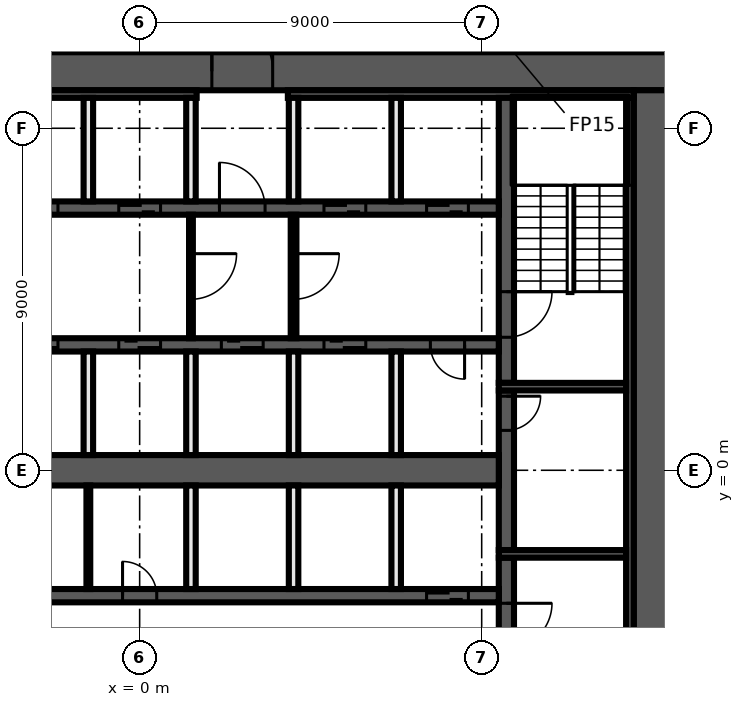
"""IFC4 building model, lengths in metres.
Left out: names, types, materials, properties, quantities, classifications, styles, units other than length and angle.
Written with IfcOpenShell. Run it as: python <this file> out.ifc"""

import sys

from ifc_helpers import new_model, si_unit, direction, frame, frame_2d, origin, place, context, subcontext, project, spatial, rectangle, extrude, element, fill, save


model = new_model("IFC4")
c1 = context("Model", 3, precision=1e-05, world=origin(), true_north=direction((0.0, 1.0)))
c2 = subcontext(c1, "Body", "Model", "MODEL_VIEW")
j1 = project(units=[si_unit("LENGTHUNIT", "METRE"), si_unit("PLANEANGLEUNIT", "RADIAN")], contexts=[c1])
p1 = place(None, origin())
s1 = spatial("IfcSite", under=j1, at=p1, CompositionType="ELEMENT")
p2 = place(p1, origin())
s2 = spatial("IfcBuilding", under=s1, at=p2, CompositionType="ELEMENT")
p3 = place(p2, frame((0.0, 0.0, 110.0)))
s3 = spatial("IfcBuildingStorey", under=s2, at=p3, CompositionType="ELEMENT", Elevation=110.0)
p4 = place(p3, frame((-14.0, 10.5, 0.0), z_axis=(0.0, 0.0, 1.0), x_axis=(1.0, 0.0, 0.0)))
e1 = element("IfcWall", 1, at=p4, inside=s3, PredefinedType="SHEAR", context=c2, shape_type="SweptSolid", body=[
    extrude(rectangle(XDim=28.0, YDim=1.0, at=frame_2d((14.0, 0.0))), origin(), (0.0, 0.0, 1.0), 3.3),
])
p5 = place(p4, frame((15.9, 0.0, 0.0)))
e2 = element("IfcOpeningElement", 2, at=p5, cuts=e1, PredefinedType="OPENING", context=c2, shape_type="SweptSolid", body=[
    extrude(rectangle(XDim=1.6, YDim=2.1, at=frame_2d((0.8, 1.05))), frame((0.0, 0.51, 0.0), z_axis=(0.0, -1.0, 0.0), x_axis=(1.0, 0.0, 0.0)), (0.0, 0.0, 1.0), 1.02),
])
p6 = place(p3, frame((13.5, 10.0, 0.0), z_axis=(0.0, 0.0, 1.0), x_axis=(0.0, -1.0, 0.0)))
e3 = element("IfcWall", 3, at=p6, inside=s3, PredefinedType="SHEAR", context=c2, shape_type="SweptSolid", body=[
    extrude(rectangle(XDim=20.0, YDim=1.0, at=frame_2d((10.0, 0.0))), origin(), (0.0, 0.0, 1.0), 3.3),
])
p7 = place(p3, frame((-13.0, 9.9, 0.0), z_axis=(0.0, 0.0, 1.0), x_axis=(1.0, 0.0, 0.0)))
e4 = element("IfcWall", 4, at=p7, inside=s3, PredefinedType="SHEAR", context=c2, shape_type="SweptSolid", body=[
    extrude(rectangle(XDim=14.5, YDim=0.2, at=frame_2d((7.25, 0.0))), origin(), (0.0, 0.0, 1.0), 3.3),
])
p8 = place(p3, frame((3.9, 9.9, 0.0), z_axis=(0.0, 0.0, 1.0), x_axis=(1.0, 0.0, 0.0)))
e5 = element("IfcWall", 5, at=p8, inside=s3, PredefinedType="SHEAR", context=c2, shape_type="SweptSolid", body=[
    extrude(rectangle(XDim=9.1, YDim=0.2, at=frame_2d((4.55, 0.0))), origin(), (0.0, 0.0, 1.0), 3.3),
])
p9 = place(p3, frame((12.9, 9.8, 0.0), z_axis=(0.0, 0.0, 1.0), x_axis=(0.0, -1.0, 0.0)))
e6 = element("IfcWall", 6, at=p9, inside=s3, PredefinedType="SHEAR", context=c2, shape_type="SweptSolid", body=[
    extrude(rectangle(XDim=19.6, YDim=0.2, at=frame_2d((9.8, 0.0))), origin(), (0.0, 0.0, 1.0), 3.3),
])
p10 = place(p3, frame((9.65, -2.3, 0.0), z_axis=(0.0, 0.0, 1.0), x_axis=(0.0, -1.0, 0.0)))
e7 = element("IfcWall", 7, at=p10, inside=s3, PredefinedType="SHEAR", context=c2, shape_type="SweptSolid", body=[
    extrude(rectangle(XDim=7.5, YDim=0.4, at=frame_2d((3.75, 0.0))), origin(), (0.0, 0.0, 1.0), 3.3),
])
p11 = place(p10, frame((1.2, 0.0, 0.0)))
e8 = element("IfcOpeningElement", 8, at=p11, cuts=e7, PredefinedType="OPENING", context=c2, shape_type="SweptSolid", body=[
    extrude(rectangle(XDim=1.2, YDim=2.1, at=frame_2d((0.6, 1.05))), frame((0.0, 0.21, 0.0), z_axis=(0.0, -1.0, 0.0), x_axis=(1.0, 0.0, 0.0)), (0.0, 0.0, 1.0), 0.42),
])
p12 = place(p3, frame((9.65, 2.1, 0.0), z_axis=(0.0, 0.0, 1.0), x_axis=(0.0, -1.0, 0.0)))
e9 = element("IfcWall", 9, at=p12, inside=s3, PredefinedType="SHEAR", context=c2, shape_type="SweptSolid", body=[
    extrude(rectangle(XDim=4.2, YDim=0.4, at=frame_2d((2.1, 0.0))), origin(), (0.0, 0.0, 1.0), 3.3),
])
p13 = place(p12, frame((0.15, 0.0, 0.0)))
e10 = element("IfcOpeningElement", 10, at=p13, cuts=e9, PredefinedType="OPENING", context=c2, shape_type="SweptSolid", body=[
    extrude(rectangle(XDim=0.9, YDim=2.1, at=frame_2d((0.45, 1.05))), frame((0.0, 0.21, 0.0), z_axis=(0.0, -1.0, 0.0), x_axis=(1.0, 0.0, 0.0)), (0.0, 0.0, 1.0), 0.42),
])
p14 = place(p3, frame((9.65, 9.8, 0.0), z_axis=(0.0, 0.0, 1.0), x_axis=(0.0, -1.0, 0.0)))
e11 = element("IfcWall", 11, at=p14, inside=s3, PredefinedType="SHEAR", context=c2, shape_type="SweptSolid", body=[
    extrude(rectangle(XDim=7.5, YDim=0.4, at=frame_2d((3.75, 0.0))), origin(), (0.0, 0.0, 1.0), 3.3),
])
p15 = place(p14, frame((5.1, 0.0, 0.0)))
e12 = element("IfcOpeningElement", 12, at=p15, cuts=e11, PredefinedType="OPENING", context=c2, shape_type="SweptSolid", body=[
    extrude(rectangle(XDim=1.2, YDim=2.1, at=frame_2d((0.6, 1.05))), frame((0.0, 0.21, 0.0), z_axis=(0.0, -1.0, 0.0), x_axis=(1.0, 0.0, 0.0)), (0.0, 0.0, 1.0), 0.42),
])
for number, where, z_axis, x_axis in (
    (13, (9.45, 2.2, 0.0), (0.0, 0.0, 1.0), (1.0, 0.0, 0.0)),
    (14, (9.45, -2.2, 0.0), (0.0, 0.0, 1.0), (1.0, 0.0, 0.0)),
):
    element("IfcWall", number, at=place(p3, frame(where, z_axis=z_axis, x_axis=x_axis)), inside=s3, PredefinedType="SHEAR", context=c2, shape_type="SweptSolid", body=[
        extrude(rectangle(XDim=3.35, YDim=0.2, at=frame_2d((1.675, 0.0))), origin(), (0.0, 0.0, 1.0), 3.3),
    ])
p16 = place(p3, frame((-9.45, 6.9, 0.0), z_axis=(0.0, 0.0, 1.0), x_axis=(1.0, 0.0, 0.0)))
e15 = element("IfcWall", 15, at=p16, inside=s3, PredefinedType="SHEAR", context=c2, shape_type="SweptSolid", body=[
    extrude(rectangle(XDim=18.9, YDim=0.35, at=frame_2d((9.45, 0.0))), origin(), (0.0, 0.0, 1.0), 3.3),
])
p17 = place(p16, frame((0.8, 0.0, 0.0)))
e16 = element("IfcOpeningElement", 16, at=p17, cuts=e15, PredefinedType="OPENING", context=c2, shape_type="SweptSolid", body=[
    extrude(rectangle(XDim=1.1, YDim=2.1, at=frame_2d((0.55, 1.05))), frame((0.0, 0.185, 0.0), z_axis=(0.0, -1.0, 0.0), x_axis=(1.0, 0.0, 0.0)), (0.0, 0.0, 1.0), 0.37),
])
p18 = place(p16, frame((3.5, 0.0, 0.0)))
e17 = element("IfcOpeningElement", 17, at=p18, cuts=e15, PredefinedType="OPENING", context=c2, shape_type="SweptSolid", body=[
    extrude(rectangle(XDim=1.1, YDim=2.1, at=frame_2d((0.55, 1.05))), frame((0.0, 0.185, 0.0), z_axis=(0.0, -1.0, 0.0), x_axis=(1.0, 0.0, 0.0)), (0.0, 0.0, 1.0), 0.37),
])
p19 = place(p16, frame((6.2, 0.0, 0.0)))
e18 = element("IfcOpeningElement", 18, at=p19, cuts=e15, PredefinedType="OPENING", context=c2, shape_type="SweptSolid", body=[
    extrude(rectangle(XDim=1.1, YDim=2.1, at=frame_2d((0.55, 1.05))), frame((0.0, 0.185, 0.0), z_axis=(0.0, -1.0, 0.0), x_axis=(1.0, 0.0, 0.0)), (0.0, 0.0, 1.0), 0.37),
])
p20 = place(p16, frame((8.9, 0.0, 0.0)))
e19 = element("IfcOpeningElement", 19, at=p20, cuts=e15, PredefinedType="OPENING", context=c2, shape_type="SweptSolid", body=[
    extrude(rectangle(XDim=1.1, YDim=2.1, at=frame_2d((0.55, 1.05))), frame((0.0, 0.185, 0.0), z_axis=(0.0, -1.0, 0.0), x_axis=(1.0, 0.0, 0.0)), (0.0, 0.0, 1.0), 0.37),
])
p21 = place(p16, frame((11.55, 0.0, 0.0)))
e20 = element("IfcOpeningElement", 20, at=p21, cuts=e15, PredefinedType="OPENING", context=c2, shape_type="SweptSolid", body=[
    extrude(rectangle(XDim=1.2, YDim=2.1, at=frame_2d((0.6, 1.05))), frame((0.0, 0.185, 0.0), z_axis=(0.0, -1.0, 0.0), x_axis=(1.0, 0.0, 0.0)), (0.0, 0.0, 1.0), 0.37),
])
p22 = place(p16, frame((14.3, 0.0, 0.0)))
e21 = element("IfcOpeningElement", 21, at=p22, cuts=e15, PredefinedType="OPENING", context=c2, shape_type="SweptSolid", body=[
    extrude(rectangle(XDim=1.1, YDim=2.1, at=frame_2d((0.55, 1.05))), frame((0.0, 0.185, 0.0), z_axis=(0.0, -1.0, 0.0), x_axis=(1.0, 0.0, 0.0)), (0.0, 0.0, 1.0), 0.37),
])
p23 = place(p16, frame((17.0, 0.0, 0.0)))
e22 = element("IfcOpeningElement", 22, at=p23, cuts=e15, PredefinedType="OPENING", context=c2, shape_type="SweptSolid", body=[
    extrude(rectangle(XDim=1.1, YDim=2.1, at=frame_2d((0.55, 1.05))), frame((0.0, 0.185, 0.0), z_axis=(0.0, -1.0, 0.0), x_axis=(1.0, 0.0, 0.0)), (0.0, 0.0, 1.0), 0.37),
])
p24 = place(p3, frame((9.45, 3.3, 0.0), z_axis=(0.0, 0.0, 1.0), x_axis=(-1.0, 0.0, 0.0)))
e23 = element("IfcWall", 23, at=p24, inside=s3, PredefinedType="SHEAR", context=c2, shape_type="SweptSolid", body=[
    extrude(rectangle(XDim=18.9, YDim=0.35, at=frame_2d((9.45, 0.0))), origin(), (0.0, 0.0, 1.0), 3.3),
])
p25 = place(p24, frame((17.0, 0.0, 0.0)))
e24 = element("IfcOpeningElement", 24, at=p25, cuts=e23, PredefinedType="OPENING", context=c2, shape_type="SweptSolid", body=[
    extrude(rectangle(XDim=1.1, YDim=2.1, at=frame_2d((0.55, 1.05))), frame((0.0, 0.185, 0.0), z_axis=(0.0, -1.0, 0.0), x_axis=(1.0, 0.0, 0.0)), (0.0, 0.0, 1.0), 0.37),
])
p26 = place(p24, frame((14.3, 0.0, 0.0)))
e25 = element("IfcOpeningElement", 25, at=p26, cuts=e23, PredefinedType="OPENING", context=c2, shape_type="SweptSolid", body=[
    extrude(rectangle(XDim=1.1, YDim=2.1, at=frame_2d((0.55, 1.05))), frame((0.0, 0.185, 0.0), z_axis=(0.0, -1.0, 0.0), x_axis=(1.0, 0.0, 0.0)), (0.0, 0.0, 1.0), 0.37),
])
p27 = place(p24, frame((11.6, 0.0, 0.0)))
e26 = element("IfcOpeningElement", 26, at=p27, cuts=e23, PredefinedType="OPENING", context=c2, shape_type="SweptSolid", body=[
    extrude(rectangle(XDim=1.1, YDim=2.1, at=frame_2d((0.55, 1.05))), frame((0.0, 0.185, 0.0), z_axis=(0.0, -1.0, 0.0), x_axis=(1.0, 0.0, 0.0)), (0.0, 0.0, 1.0), 0.37),
])
p28 = place(p24, frame((8.9, 0.0, 0.0)))
e27 = element("IfcOpeningElement", 27, at=p28, cuts=e23, PredefinedType="OPENING", context=c2, shape_type="SweptSolid", body=[
    extrude(rectangle(XDim=1.1, YDim=2.1, at=frame_2d((0.55, 1.05))), frame((0.0, 0.185, 0.0), z_axis=(0.0, -1.0, 0.0), x_axis=(1.0, 0.0, 0.0)), (0.0, 0.0, 1.0), 0.37),
])
p29 = place(p24, frame((6.2, 0.0, 0.0)))
e28 = element("IfcOpeningElement", 28, at=p29, cuts=e23, PredefinedType="OPENING", context=c2, shape_type="SweptSolid", body=[
    extrude(rectangle(XDim=1.1, YDim=2.1, at=frame_2d((0.55, 1.05))), frame((0.0, 0.185, 0.0), z_axis=(0.0, -1.0, 0.0), x_axis=(1.0, 0.0, 0.0)), (0.0, 0.0, 1.0), 0.37),
])
p30 = place(p24, frame((3.5, 0.0, 0.0)))
e29 = element("IfcOpeningElement", 29, at=p30, cuts=e23, PredefinedType="OPENING", context=c2, shape_type="SweptSolid", body=[
    extrude(rectangle(XDim=1.1, YDim=2.1, at=frame_2d((0.55, 1.05))), frame((0.0, 0.185, 0.0), z_axis=(0.0, -1.0, 0.0), x_axis=(1.0, 0.0, 0.0)), (0.0, 0.0, 1.0), 0.37),
])
p31 = place(p24, frame((0.9, 0.0, 0.0)))
e30 = element("IfcOpeningElement", 30, at=p31, cuts=e23, PredefinedType="OPENING", context=c2, shape_type="SweptSolid", body=[
    extrude(rectangle(XDim=0.9, YDim=2.1, at=frame_2d((0.45, 1.05))), frame((0.0, 0.185, 0.0), z_axis=(0.0, -1.0, 0.0), x_axis=(1.0, 0.0, 0.0)), (0.0, 0.0, 1.0), 0.37),
])
p32 = place(p3, frame((-9.45, -3.3, 0.0), z_axis=(0.0, 0.0, 1.0), x_axis=(1.0, 0.0, 0.0)))
e31 = element("IfcWall", 31, at=p32, inside=s3, PredefinedType="SHEAR", context=c2, shape_type="SweptSolid", body=[
    extrude(rectangle(XDim=18.9, YDim=0.35, at=frame_2d((9.45, 0.0))), origin(), (0.0, 0.0, 1.0), 3.3),
])
p33 = place(p32, frame((17.0, 0.0, 0.0)))
e32 = element("IfcOpeningElement", 32, at=p33, cuts=e31, PredefinedType="OPENING", context=c2, shape_type="SweptSolid", body=[
    extrude(rectangle(XDim=1.1, YDim=2.1, at=frame_2d((0.55, 1.05))), frame((0.0, 0.185, 0.0), z_axis=(0.0, -1.0, 0.0), x_axis=(1.0, 0.0, 0.0)), (0.0, 0.0, 1.0), 0.37),
])
p34 = place(p32, frame((3.6, 0.0, 0.0)))
e33 = element("IfcOpeningElement", 33, at=p34, cuts=e31, PredefinedType="OPENING", context=c2, shape_type="SweptSolid", body=[
    extrude(rectangle(XDim=0.9, YDim=2.1, at=frame_2d((0.45, 1.05))), frame((0.0, 0.185, 0.0), z_axis=(0.0, -1.0, 0.0), x_axis=(1.0, 0.0, 0.0)), (0.0, 0.0, 1.0), 0.37),
])
p35 = place(p32, frame((9.0, 0.0, 0.0)))
e34 = element("IfcOpeningElement", 34, at=p35, cuts=e31, PredefinedType="OPENING", context=c2, shape_type="SweptSolid", body=[
    extrude(rectangle(XDim=0.9, YDim=2.1, at=frame_2d((0.45, 1.05))), frame((0.0, 0.185, 0.0), z_axis=(0.0, -1.0, 0.0), x_axis=(1.0, 0.0, 0.0)), (0.0, 0.0, 1.0), 0.37),
])
p36 = place(p3, frame((-9.45, 0.0, 0.0), z_axis=(0.0, 0.0, 1.0), x_axis=(1.0, 0.0, 0.0)))
e35 = element("IfcWall", 35, at=p36, inside=s3, PredefinedType="SHEAR", context=c2, shape_type="SweptSolid", body=[
    extrude(rectangle(XDim=18.9, YDim=0.8, at=frame_2d((9.45, 0.0))), origin(), (0.0, 0.0, 1.0), 3.3),
])
for number, where, z_axis, x_axis in (
    (36, (6.75, -3.125, 0.0), (0.0, 0.0, 1.0), (0.0, 1.0, 0.0)),
    (37, (6.75, 0.4, 0.0), (0.0, 0.0, 1.0), (0.0, 1.0, 0.0)),
    (38, (6.75, 7.075, 0.0), (0.0, 0.0, 1.0), (0.0, 1.0, 0.0)),
):
    element("IfcWall", number, at=place(p3, frame(where, z_axis=z_axis, x_axis=x_axis)), inside=s3, PredefinedType="SOLIDWALL", context=c2, shape_type="SweptSolid", body=[
        extrude(rectangle(XDim=2.725, YDim=0.25, at=frame_2d((1.363, 0.0))), origin(), (0.0, 0.0, 1.0), 3.3),
    ])
p37 = place(p3, frame((4.05, 6.725, 0.0), z_axis=(0.0, 0.0, 1.0), x_axis=(0.0, -1.0, 0.0)))
e39 = element("IfcWall", 39, at=p37, inside=s3, PredefinedType="PARTITIONING", context=c2, shape_type="SweptSolid", body=[
    extrude(rectangle(XDim=3.25, YDim=0.15, at=frame_2d((1.625, 0.0))), origin(), (0.0, 0.0, 1.0), 3.3),
])
p38 = place(p37, frame((1.025, 0.0, 0.0)))
e40 = element("IfcOpeningElement", 40, at=p38, cuts=e39, PredefinedType="OPENING", context=c2, shape_type="SweptSolid", body=[
    extrude(rectangle(XDim=1.2, YDim=2.1, at=frame_2d((0.6, 1.05))), frame((0.0, 0.085, 0.0), z_axis=(0.0, -1.0, 0.0), x_axis=(1.0, 0.0, 0.0)), (0.0, 0.0, 1.0), 0.17),
])
for number, where, z_axis, x_axis in (
    (41, (4.05, -3.125, 0.0), (0.0, 0.0, 1.0), (0.0, 1.0, 0.0)),
    (42, (4.05, 0.4, 0.0), (0.0, 0.0, 1.0), (0.0, 1.0, 0.0)),
    (43, (4.05, 7.075, 0.0), (0.0, 0.0, 1.0), (0.0, 1.0, 0.0)),
):
    element("IfcWall", number, at=place(p3, frame(where, z_axis=z_axis, x_axis=x_axis)), inside=s3, PredefinedType="SOLIDWALL", context=c2, shape_type="SweptSolid", body=[
        extrude(rectangle(XDim=2.725, YDim=0.25, at=frame_2d((1.363, 0.0))), origin(), (0.0, 0.0, 1.0), 3.3),
    ])
p39 = place(p3, frame((1.35, 6.725, 0.0), z_axis=(0.0, 0.0, 1.0), x_axis=(0.0, -1.0, 0.0)))
e44 = element("IfcWall", 44, at=p39, inside=s3, PredefinedType="PARTITIONING", context=c2, shape_type="SweptSolid", body=[
    extrude(rectangle(XDim=3.25, YDim=0.1, at=frame_2d((1.625, 0.0))), origin(), (0.0, 0.0, 1.0), 3.3),
])
p40 = place(p39, frame((1.025, 0.0, 0.0)))
e45 = element("IfcOpeningElement", 45, at=p40, cuts=e44, PredefinedType="OPENING", context=c2, shape_type="SweptSolid", body=[
    extrude(rectangle(XDim=1.2, YDim=2.1, at=frame_2d((0.6, 1.05))), frame((0.0, 0.06, 0.0), z_axis=(0.0, -1.0, 0.0), x_axis=(1.0, 0.0, 0.0)), (0.0, 0.0, 1.0), 0.12),
])
for number, where, z_axis, x_axis in (
    (46, (1.35, -3.125, 0.0), (0.0, 0.0, 1.0), (0.0, 1.0, 0.0)),
    (47, (1.35, 0.4, 0.0), (0.0, 0.0, 1.0), (0.0, 1.0, 0.0)),
    (48, (1.35, 7.075, 0.0), (0.0, 0.0, 1.0), (0.0, 1.0, 0.0)),
):
    element("IfcWall", number, at=place(p3, frame(where, z_axis=z_axis, x_axis=x_axis)), inside=s3, PredefinedType="SOLIDWALL", context=c2, shape_type="SweptSolid", body=[
        extrude(rectangle(XDim=2.725, YDim=0.25, at=frame_2d((1.363, 0.0))), origin(), (0.0, 0.0, 1.0), 3.3),
    ])
p41 = place(p3, frame((-1.35, -3.125, 0.0), z_axis=(0.0, 0.0, 1.0), x_axis=(0.0, 1.0, 0.0)))
e49 = element("IfcWall", 49, at=p41, inside=s3, PredefinedType="PARTITIONING", context=c2, shape_type="SweptSolid", body=[
    extrude(rectangle(XDim=2.725, YDim=0.1, at=frame_2d((1.363, 0.0))), origin(), (0.0, 0.0, 1.0), 3.3),
])
for number, where, z_axis, x_axis in (
    (50, (-1.35, 0.4, 0.0), (0.0, 0.0, 1.0), (0.0, 1.0, 0.0)),
    (51, (-1.35, 7.075, 0.0), (0.0, 0.0, 1.0), (0.0, 1.0, 0.0)),
):
    element("IfcWall", number, at=place(p3, frame(where, z_axis=z_axis, x_axis=x_axis)), inside=s3, PredefinedType="SOLIDWALL", context=c2, shape_type="SweptSolid", body=[
        extrude(rectangle(XDim=2.725, YDim=0.25, at=frame_2d((1.363, 0.0))), origin(), (0.0, 0.0, 1.0), 3.3),
    ])
p42 = place(p13, origin())
e52 = element("IfcDoor", 52, at=p42, inside=s3, OperationType="SINGLE_SWING_RIGHT", PredefinedType="DOOR", context=c2, shape_type="SweptSolid", body=[
    extrude(rectangle(XDim=0.9, YDim=2.1, at=frame_2d((0.45, 1.05))), frame((0.0, 0.025, 0.0), z_axis=(0.0, -1.0, 0.0), x_axis=(1.0, 0.0, 0.0)), (0.0, 0.0, 1.0), 0.05),
])
fill(e10, e52)
p43 = place(p19, origin())
e53 = element("IfcDoor", 53, at=p43, inside=s3, OperationType="DOUBLE_DOOR_SLIDING", PredefinedType="DOOR", context=c2, shape_type="SweptSolid", body=[
    extrude(rectangle(XDim=1.1, YDim=2.1, at=frame_2d((0.55, 1.05))), frame((0.0, 0.025, 0.0), z_axis=(0.0, -1.0, 0.0), x_axis=(1.0, 0.0, 0.0)), (0.0, 0.0, 1.0), 0.05),
])
fill(e18, e53)
p44 = place(p20, origin())
e54 = element("IfcDoor", 54, at=p44, inside=s3, OperationType="DOUBLE_DOOR_SLIDING", PredefinedType="DOOR", context=c2, shape_type="SweptSolid", body=[
    extrude(rectangle(XDim=1.1, YDim=2.1, at=frame_2d((0.55, 1.05))), frame((0.0, 0.025, 0.0), z_axis=(0.0, -1.0, 0.0), x_axis=(1.0, 0.0, 0.0)), (0.0, 0.0, 1.0), 0.05),
])
fill(e19, e54)
p45 = place(p5, origin())
e55 = element("IfcDoor", 55, at=p45, inside=s3, OperationType="DOUBLE_DOOR_SINGLE_SWING", PredefinedType="DOOR", context=c2, shape_type="SweptSolid", body=[
    extrude(rectangle(XDim=1.6, YDim=2.1, at=frame_2d((0.8, 1.05))), frame((0.0, 0.025, 0.0), z_axis=(0.0, -1.0, 0.0), x_axis=(1.0, 0.0, 0.0)), (0.0, 0.0, 1.0), 0.05),
])
fill(e2, e55)
p46 = place(p21, origin())
e56 = element("IfcDoor", 56, at=p46, inside=s3, OperationType="SINGLE_SWING_LEFT", PredefinedType="DOOR", context=c2, shape_type="SweptSolid", body=[
    extrude(rectangle(XDim=1.2, YDim=2.1, at=frame_2d((0.6, 1.05))), frame((0.0, 0.025, 0.0), z_axis=(0.0, -1.0, 0.0), x_axis=(1.0, 0.0, 0.0)), (0.0, 0.0, 1.0), 0.05),
])
fill(e20, e56)
p47 = place(p22, origin())
e57 = element("IfcDoor", 57, at=p47, inside=s3, OperationType="DOUBLE_DOOR_SLIDING", PredefinedType="DOOR", context=c2, shape_type="SweptSolid", body=[
    extrude(rectangle(XDim=1.1, YDim=2.1, at=frame_2d((0.55, 1.05))), frame((0.0, 0.025, 0.0), z_axis=(0.0, -1.0, 0.0), x_axis=(1.0, 0.0, 0.0)), (0.0, 0.0, 1.0), 0.05),
])
fill(e21, e57)
p48 = place(p23, origin())
e58 = element("IfcDoor", 58, at=p48, inside=s3, OperationType="DOUBLE_DOOR_SLIDING", PredefinedType="DOOR", context=c2, shape_type="SweptSolid", body=[
    extrude(rectangle(XDim=1.1, YDim=2.1, at=frame_2d((0.55, 1.05))), frame((0.0, 0.025, 0.0), z_axis=(0.0, -1.0, 0.0), x_axis=(1.0, 0.0, 0.0)), (0.0, 0.0, 1.0), 0.05),
])
fill(e22, e58)
p49 = place(p27, origin())
e59 = element("IfcDoor", 59, at=p49, inside=s3, OperationType="DOUBLE_DOOR_SLIDING", PredefinedType="DOOR", context=c2, shape_type="SweptSolid", body=[
    extrude(rectangle(XDim=1.1, YDim=2.1, at=frame_2d((0.55, 1.05))), frame((0.0, 0.025, 0.0), z_axis=(0.0, -1.0, 0.0), x_axis=(1.0, 0.0, 0.0)), (0.0, 0.0, 1.0), 0.05),
])
fill(e26, e59)
p50 = place(p28, origin())
e60 = element("IfcDoor", 60, at=p50, inside=s3, OperationType="DOUBLE_DOOR_SLIDING", PredefinedType="DOOR", context=c2, shape_type="SweptSolid", body=[
    extrude(rectangle(XDim=1.1, YDim=2.1, at=frame_2d((0.55, 1.05))), frame((0.0, 0.025, 0.0), z_axis=(0.0, -1.0, 0.0), x_axis=(1.0, 0.0, 0.0)), (0.0, 0.0, 1.0), 0.05),
])
fill(e27, e60)
p51 = place(p29, origin())
e61 = element("IfcDoor", 61, at=p51, inside=s3, OperationType="DOUBLE_DOOR_SLIDING", PredefinedType="DOOR", context=c2, shape_type="SweptSolid", body=[
    extrude(rectangle(XDim=1.1, YDim=2.1, at=frame_2d((0.55, 1.05))), frame((0.0, 0.025, 0.0), z_axis=(0.0, -1.0, 0.0), x_axis=(1.0, 0.0, 0.0)), (0.0, 0.0, 1.0), 0.05),
])
fill(e28, e61)
p52 = place(p30, origin())
e62 = element("IfcDoor", 62, at=p52, inside=s3, OperationType="DOUBLE_DOOR_SLIDING", PredefinedType="DOOR", context=c2, shape_type="SweptSolid", body=[
    extrude(rectangle(XDim=1.1, YDim=2.1, at=frame_2d((0.55, 1.05))), frame((0.0, 0.025, 0.0), z_axis=(0.0, -1.0, 0.0), x_axis=(1.0, 0.0, 0.0)), (0.0, 0.0, 1.0), 0.05),
])
fill(e29, e62)
p53 = place(p31, origin())
e63 = element("IfcDoor", 63, at=p53, inside=s3, OperationType="SINGLE_SWING_LEFT", PredefinedType="DOOR", context=c2, shape_type="SweptSolid", body=[
    extrude(rectangle(XDim=0.9, YDim=2.1, at=frame_2d((0.45, 1.05))), frame((0.0, 0.025, 0.0), z_axis=(0.0, -1.0, 0.0), x_axis=(1.0, 0.0, 0.0)), (0.0, 0.0, 1.0), 0.05),
])
fill(e30, e63)
p54 = place(p33, origin())
e64 = element("IfcDoor", 64, at=p54, inside=s3, OperationType="DOUBLE_DOOR_SLIDING", PredefinedType="DOOR", context=c2, shape_type="SweptSolid", body=[
    extrude(rectangle(XDim=1.1, YDim=2.1, at=frame_2d((0.55, 1.05))), frame((0.0, 0.025, 0.0), z_axis=(0.0, -1.0, 0.0), x_axis=(1.0, 0.0, 0.0)), (0.0, 0.0, 1.0), 0.05),
])
fill(e32, e64)
p55 = place(p35, origin())
e65 = element("IfcDoor", 65, at=p55, inside=s3, OperationType="SINGLE_SWING_LEFT", PredefinedType="DOOR", context=c2, shape_type="SweptSolid", body=[
    extrude(rectangle(XDim=0.9, YDim=2.1, at=frame_2d((0.45, 1.05))), frame((0.0, 0.025, 0.0), z_axis=(0.0, -1.0, 0.0), x_axis=(1.0, 0.0, 0.0)), (0.0, 0.0, 1.0), 0.05),
])
fill(e34, e65)
p56 = place(p15, origin())
e66 = element("IfcDoor", 66, at=p56, inside=s3, OperationType="SINGLE_SWING_LEFT", PredefinedType="DOOR", context=c2, shape_type="SweptSolid", body=[
    extrude(rectangle(XDim=1.2, YDim=2.1, at=frame_2d((0.6, 1.05))), frame((0.0, 0.025, 0.0), z_axis=(0.0, -1.0, 0.0), x_axis=(1.0, 0.0, 0.0)), (0.0, 0.0, 1.0), 0.05),
])
fill(e12, e66)
p57 = place(p11, origin())
e67 = element("IfcDoor", 67, at=p57, inside=s3, OperationType="SINGLE_SWING_RIGHT", PredefinedType="DOOR", context=c2, shape_type="SweptSolid", body=[
    extrude(rectangle(XDim=1.2, YDim=2.1, at=frame_2d((0.6, 1.05))), frame((0.0, 0.025, 0.0), z_axis=(0.0, -1.0, 0.0), x_axis=(1.0, 0.0, 0.0)), (0.0, 0.0, 1.0), 0.05),
])
fill(e8, e67)
p58 = place(p40, origin())
e68 = element("IfcDoor", 68, at=p58, inside=s3, OperationType="SINGLE_SWING_LEFT", PredefinedType="DOOR", context=c2, shape_type="SweptSolid", body=[
    extrude(rectangle(XDim=1.2, YDim=2.1, at=frame_2d((0.6, 1.05))), frame((0.0, 0.025, 0.0), z_axis=(0.0, -1.0, 0.0), x_axis=(1.0, 0.0, 0.0)), (0.0, 0.0, 1.0), 0.05),
])
fill(e45, e68)
p59 = place(p38, origin())
e69 = element("IfcDoor", 69, at=p59, inside=s3, OperationType="SINGLE_SWING_RIGHT", PredefinedType="DOOR", context=c2, shape_type="SweptSolid", body=[
    extrude(rectangle(XDim=1.2, YDim=2.1, at=frame_2d((0.6, 1.05))), frame((0.0, 0.025, 0.0), z_axis=(0.0, -1.0, 0.0), x_axis=(1.0, 0.0, 0.0)), (0.0, 0.0, 1.0), 0.05),
])
fill(e40, e69)
save(model, sys.argv[1])
